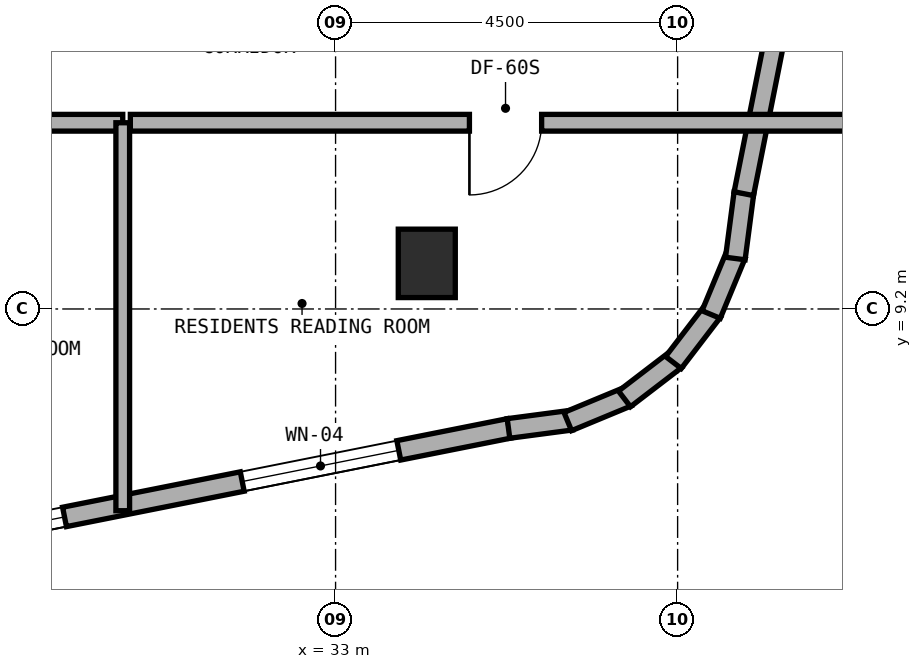
"""IFC4 building model, lengths in metres.
Left out: names, types, materials, properties, quantities, classifications, styles, units other than length and angle.
Written with IfcOpenShell. Run it as: python <this file> out.ifc"""

import sys

from ifc_helpers import new_model, si_unit, direction, frame, frame_2d, origin, origin_2d, place, context, subcontext, project, spatial, rectangle, extrude, element, fill, save


model = new_model("IFC4")
c1 = context("Model", 3, precision=1e-05, world=origin(), true_north=direction((0.0, 1.0)))
c2 = subcontext(c1, "Body", "Model", "MODEL_VIEW")
j1 = project(units=[si_unit("LENGTHUNIT", "METRE"), si_unit("PLANEANGLEUNIT", "RADIAN")], contexts=[c1])
p1 = place(None, origin())
s1 = spatial("IfcSite", under=j1, at=p1, CompositionType="ELEMENT")
p2 = place(p1, origin())
s2 = spatial("IfcBuilding", under=s1, at=p2, CompositionType="ELEMENT")
p3 = place(p2, frame((0.0, 0.0, 202.7)))
s3 = spatial("IfcBuildingStorey", under=s2, at=p3, CompositionType="ELEMENT", Elevation=202.7)
p4 = place(p3, frame((34.2, 9.8, 0.0), z_axis=(0.0, 0.0, 1.0), x_axis=(1.0, 0.0, 0.0)))
e1 = element("IfcColumn", 1, at=p4, inside=s3, PredefinedType="COLUMN", context=c2, shape_type="SweptSolid", body=[
    extrude(rectangle(XDim=0.75, YDim=0.9, at=origin_2d()), origin(), (0.0, 0.0, 1.0), 3.6),
])
p5 = place(p3, frame((26.681, 5.916, 0.0), z_axis=(0.0, 0.0, 1.0), x_axis=(0.980745199176, 0.195291715883, 0.0)))
e2 = element("IfcWall", 2, at=p5, inside=s3, PredefinedType="STANDARD", context=c2, shape_type="SweptSolid", body=[
    extrude(rectangle(XDim=8.771, YDim=0.26, at=frame_2d((4.385, 0.0))), origin(), (0.0, 0.0, 1.0), 3.32),
])
p6 = place(p5, frame((0.707, 0.0, 0.85)))
e3 = element("IfcOpeningElement", 3, at=p6, cuts=e2, PredefinedType="OPENING", context=c2, shape_type="SweptSolid", body=[
    extrude(rectangle(XDim=2.1, YDim=1.5, at=frame_2d((1.05, 0.75))), frame((0.0, 0.14, 0.0), z_axis=(0.0, -1.0, 0.0), x_axis=(1.0, 0.0, 0.0)), (0.0, 0.0, 1.0), 0.28),
])
p7 = place(p5, frame((5.191, 0.0, 0.85)))
e4 = element("IfcOpeningElement", 4, at=p7, cuts=e2, PredefinedType="OPENING", context=c2, shape_type="SweptSolid", body=[
    extrude(rectangle(XDim=2.1, YDim=1.5, at=frame_2d((1.05, 0.75))), frame((0.0, 0.14, 0.0), z_axis=(0.0, -1.0, 0.0), x_axis=(1.0, 0.0, 0.0)), (0.0, 0.0, 1.0), 0.28),
])
p8 = place(p3, frame((35.275, 7.628, 0.0), z_axis=(0.0, 0.0, 1.0), x_axis=(0.9913883573, 0.130954667764, 0.0)))
e5 = element("IfcWall", 5, at=p8, inside=s3, PredefinedType="STANDARD", context=c2, shape_type="SweptSolid", body=[
    extrude(rectangle(XDim=0.833, YDim=0.26, at=frame_2d((0.417, 0.0))), origin(), (0.0, 0.0, 1.0), 3.32),
])
p9 = place(p3, frame((36.055, 7.719, 0.0), z_axis=(0.0, 0.0, 1.0), x_axis=(0.923754491172, 0.382985169477, 0.0)))
e6 = element("IfcWall", 6, at=p9, inside=s3, PredefinedType="STANDARD", context=c2, shape_type="SweptSolid", body=[
    extrude(rectangle(XDim=0.851, YDim=0.26, at=frame_2d((0.426, 0.0))), origin(), (0.0, 0.0, 1.0), 3.32),
])
for number, where, z_axis, x_axis in (
    (7, (36.801, 8.017, 0.0), (0.0, 0.0, 1.0), (0.794, 0.608, 0.0)),
    (8, (37.445, 8.496, 0.0), (0.0, 0.0, 1.0), (0.608, 0.794, 0.0)),
):
    element("IfcWall", number, at=place(p3, frame(where, z_axis=z_axis, x_axis=x_axis)), inside=s3, PredefinedType="STANDARD", context=c2, shape_type="SweptSolid", body=[
        extrude(rectangle(XDim=0.85, YDim=0.26, at=frame_2d((0.425, 0.0))), origin(), (0.0, 0.0, 1.0), 3.32),
    ])
p10 = place(p3, frame((37.941, 9.127, 0.0), z_axis=(0.0, 0.0, 1.0), x_axis=(0.383229930484, 0.923652976167, 0.0)))
e9 = element("IfcWall", 9, at=p10, inside=s3, PredefinedType="STANDARD", context=c2, shape_type="SweptSolid", body=[
    extrude(rectangle(XDim=0.851, YDim=0.26, at=frame_2d((0.426, 0.0))), origin(), (0.0, 0.0, 1.0), 3.32),
])
p11 = place(p3, frame((38.259, 9.864, 0.0), z_axis=(0.0, 0.0, 1.0), x_axis=(0.130156359936, 0.991493480548, 0.0)))
e10 = element("IfcWall", 10, at=p11, inside=s3, PredefinedType="STANDARD", context=c2, shape_type="SweptSolid", body=[
    extrude(rectangle(XDim=0.868, YDim=0.26, at=frame_2d((0.434, 0.0))), origin(), (0.0, 0.0, 1.0), 3.32),
])
p12 = place(p3, frame((38.371, 10.717, 0.0), z_axis=(0.0, 0.0, 1.0), x_axis=(0.195291715883, 0.980745199176, 0.0)))
e11 = element("IfcWall", 11, at=p12, inside=s3, PredefinedType="STANDARD", context=c2, shape_type="SweptSolid", body=[
    extrude(rectangle(XDim=8.771, YDim=0.26, at=frame_2d((4.385, 0.0))), origin(), (0.0, 0.0, 1.0), 3.32),
])
p13 = place(p12, frame((3.873, 0.0, 0.85)))
e12 = element("IfcOpeningElement", 12, at=p13, cuts=e11, PredefinedType="OPENING", context=c2, shape_type="SweptSolid", body=[
    extrude(rectangle(XDim=2.1, YDim=1.5, at=frame_2d((1.05, 0.75))), frame((0.0, 0.14, 0.0), z_axis=(0.0, -1.0, 0.0), x_axis=(1.0, 0.0, 0.0)), (0.0, 0.0, 1.0), 0.28),
])
p14 = place(p3, frame((18.4, 11.65, 0.0), z_axis=(0.0, 0.0, 1.0), x_axis=(1.0, 0.0, 0.0)))
e13 = element("IfcWall", 13, at=p14, inside=s3, PredefinedType="SOLIDWALL", context=c2, shape_type="SweptSolid", body=[
    extrude(rectangle(XDim=11.8, YDim=0.22, at=frame_2d((5.9, 0.0))), origin(), (0.0, 0.0, 1.0), 2.695),
])
p15 = place(p14, frame((5.425, 0.0, 0.0)))
e14 = element("IfcOpeningElement", 14, at=p15, cuts=e13, PredefinedType="OPENING", context=c2, shape_type="SweptSolid", body=[
    extrude(rectangle(XDim=0.95, YDim=2.1, at=frame_2d((0.475, 1.05))), frame((0.0, 0.12, 0.0), z_axis=(0.0, -1.0, 0.0), x_axis=(1.0, 0.0, 0.0)), (0.0, 0.0, 1.0), 0.24),
])
p16 = place(p3, frame((30.2, 6.546, 0.0), z_axis=(0.0, 0.0, 1.0), x_axis=(0.0, 1.0, 0.0)))
e15 = element("IfcWall", 15, at=p16, inside=s3, PredefinedType="SOLIDWALL", context=c2, shape_type="SweptSolid", body=[
    extrude(rectangle(XDim=5.104, YDim=0.18, at=frame_2d((2.552, 0.0))), origin(), (0.0, 0.0, 1.0), 2.845),
])
p17 = place(p3, frame((30.3, 11.65, 0.0), z_axis=(0.0, 0.0, 1.0), x_axis=(1.0, 0.0, 0.0)))
e16 = element("IfcWall", 16, at=p17, inside=s3, PredefinedType="SOLIDWALL", context=c2, shape_type="SweptSolid", body=[
    extrude(rectangle(XDim=9.64, YDim=0.22, at=frame_2d((4.82, 0.0))), origin(), (0.0, 0.0, 1.0), 2.695),
])
p18 = place(p17, frame((4.461, 0.0, 0.0)))
e17 = element("IfcOpeningElement", 17, at=p18, cuts=e16, PredefinedType="OPENING", context=c2, shape_type="SweptSolid", body=[
    extrude(rectangle(XDim=0.95, YDim=2.1, at=frame_2d((0.475, 1.05))), frame((0.0, 0.12, 0.0), z_axis=(0.0, -1.0, 0.0), x_axis=(1.0, 0.0, 0.0)), (0.0, 0.0, 1.0), 0.24),
])
p19 = place(p6, origin())
e18 = element("IfcWindow", 18, at=p19, inside=s3, PartitioningType="SINGLE_PANEL", PredefinedType="WINDOW", context=c2, shape_type="SweptSolid", body=[
    extrude(rectangle(XDim=2.1, YDim=1.5, at=frame_2d((1.05, 0.75))), frame((0.0, 0.03, 0.0), z_axis=(0.0, -1.0, 0.0), x_axis=(1.0, 0.0, 0.0)), (0.0, 0.0, 1.0), 0.06),
])
fill(e3, e18)
p20 = place(p7, origin())
e19 = element("IfcWindow", 19, at=p20, inside=s3, PartitioningType="SINGLE_PANEL", PredefinedType="WINDOW", context=c2, shape_type="SweptSolid", body=[
    extrude(rectangle(XDim=2.1, YDim=1.5, at=frame_2d((1.05, 0.75))), frame((0.0, 0.03, 0.0), z_axis=(0.0, -1.0, 0.0), x_axis=(1.0, 0.0, 0.0)), (0.0, 0.0, 1.0), 0.06),
])
fill(e4, e19)
p21 = place(p18, frame((0.95, 0.0, 0.0), z_axis=(0.0, 0.0, 1.0), x_axis=(-1.0, 0.0, 0.0)))
e20 = element("IfcDoor", 20, at=p21, inside=s3, OperationType="SINGLE_SWING_RIGHT", PredefinedType="DOOR", context=c2, shape_type="SweptSolid", body=[
    extrude(rectangle(XDim=0.95, YDim=2.1, at=frame_2d((0.475, 1.05))), frame((0.0, 0.025, 0.0), z_axis=(0.0, -1.0, 0.0), x_axis=(1.0, 0.0, 0.0)), (0.0, 0.0, 1.0), 0.05),
])
fill(e17, e20)
save(model, sys.argv[1])
